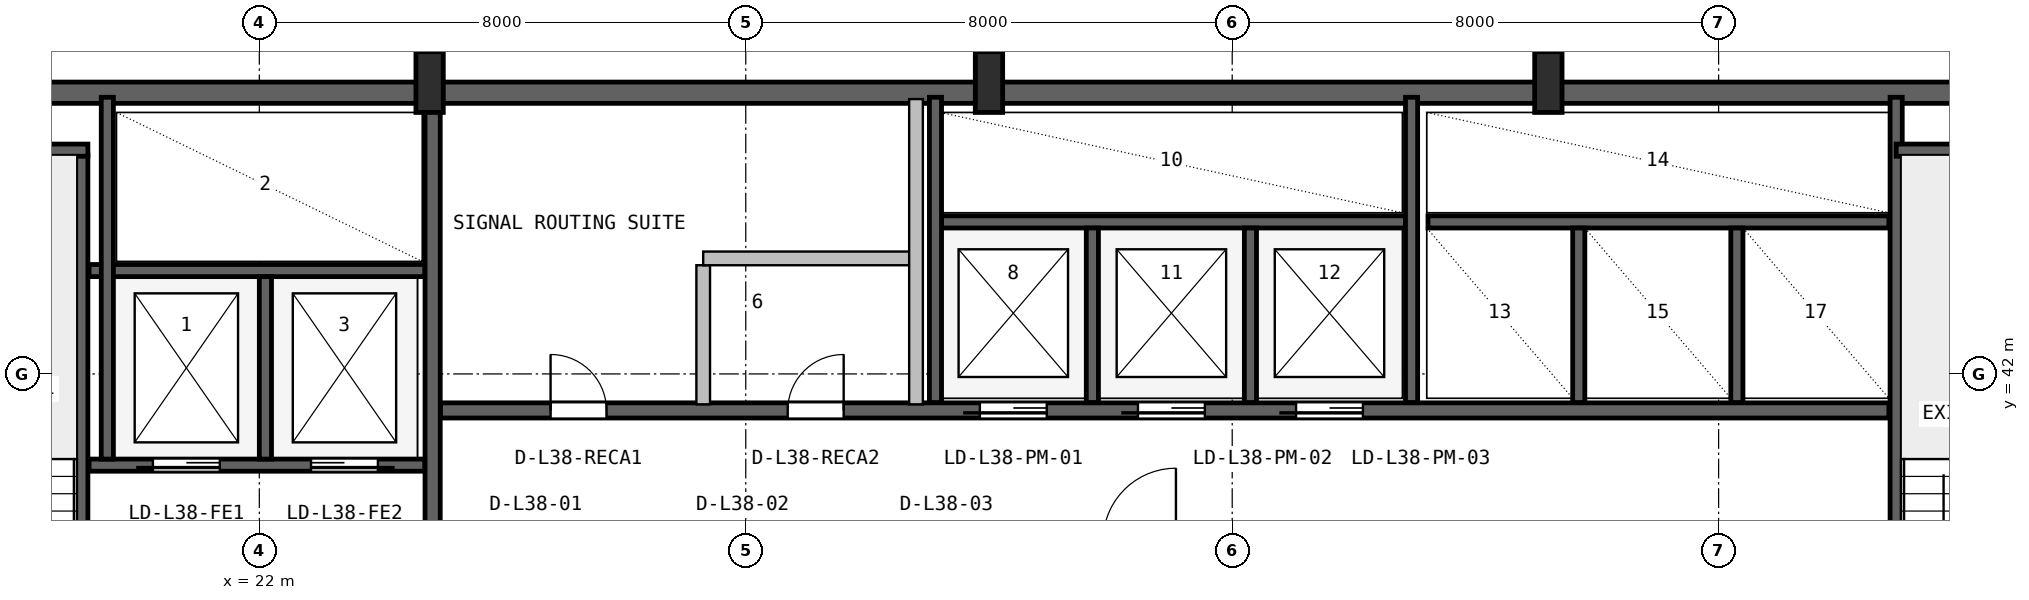
"""IFC4 building model, lengths in metres.
Left out: names, types, materials, properties, quantities, classifications, styles, units other than length and angle.
Written with IfcOpenShell. Run it as: python <this file> out.ifc"""

import sys

from ifc_helpers import new_model, si_unit, direction, frame, frame_2d, origin, origin_2d, place, context, subcontext, project, spatial, rectangle, i_section, extrude, source, transform, mapped, element, fill, save


model = new_model("IFC4")
c1 = context("Model", 3, precision=1e-05, world=origin(), true_north=direction((0.0, 1.0)))
c2 = subcontext(c1, "Body", "Model", "MODEL_VIEW")
j1 = project(units=[si_unit("LENGTHUNIT", "METRE"), si_unit("PLANEANGLEUNIT", "RADIAN")], contexts=[c1])
p1 = place(None, origin())
s1 = spatial("IfcSite", under=j1, at=p1, CompositionType="ELEMENT")
p2 = place(p1, origin())
s2 = spatial("IfcBuilding", under=s1, at=p2, CompositionType="ELEMENT")
p3 = place(p2, frame((0.0, 0.0, 157.2)))
s3 = spatial("IfcBuildingStorey", under=s2, at=p3, CompositionType="ELEMENT", Elevation=157.2)
p4 = place(p3, frame((15.6, 46.625, 0.0), z_axis=(0.0, 0.0, 1.0), x_axis=(1.0, 0.0, 0.0)))
e1 = element("IfcWall", 1, at=p4, inside=s3, PredefinedType="SHEAR", context=c2, shape_type="SweptSolid", body=[
    extrude(rectangle(XDim=36.8, YDim=0.35, at=frame_2d((18.4, 0.0))), origin(), (0.0, 0.0, 1.0), 3.55),
])
m1 = source(origin(), c2, "Body", "SweptSolid", [
    extrude(i_section(OverallWidth=0.45, OverallDepth=1.0, WebThickness=0.016, FlangeThickness=0.03, FilletRadius=0.016, at=origin_2d()), origin(), (0.0, 0.0, 1.0), 3.8),
])
for number, where, z_axis, x_axis in (
    (2, (24.8, 46.8, 0.0), (0.0, 0.0, 1.0), (1.0, 0.0, 0.0)),
    (3, (34.0, 46.8, 0.0), (0.0, 0.0, 1.0), (1.0, 0.0, 0.0)),
    (4, (43.2, 46.8, 0.0), (0.0, 0.0, 1.0), (1.0, 0.0, 0.0)),
):
    element("IfcColumn", number, at=place(p3, frame(where, z_axis=z_axis, x_axis=x_axis)), inside=s3, PredefinedType="COLUMN", context=c2, shape_type="MappedRepresentation", body=[
        mapped(m1, transform((0.0, 0.0, 0.0), x_axis=(1.0, 0.0, 0.0), y_axis=(0.0, 1.0, 0.0), z_axis=(0.0, 0.0, 1.0), scale=1.0)),
    ])
p5 = place(p3, frame((19.08, 35.95, 0.0), z_axis=(0.0, 0.0, 1.0), x_axis=(0.0, 1.0, 0.0)))
e5 = element("IfcWall", 5, at=p5, inside=s3, PredefinedType="SHEAR", context=c2, shape_type="SweptSolid", body=[
    extrude(rectangle(XDim=9.65, YDim=0.2, at=frame_2d((4.825, 0.0))), origin(), (0.0, 0.0, 1.0), 3.55),
])
p6 = place(p5, frame((0.25, 0.0, 0.0)))
e6 = element("IfcOpeningElement", 6, at=p6, cuts=e5, PredefinedType="OPENING", context=c2, shape_type="SweptSolid", body=[
    extrude(rectangle(XDim=0.95, YDim=2.1, at=frame_2d((0.475, 1.05))), frame((0.0, 0.11, 0.0), z_axis=(0.0, -1.0, 0.0), x_axis=(1.0, 0.0, 0.0)), (0.0, 0.0, 1.0), 0.22),
])
p7 = place(p3, frame((15.95, 45.68, 0.0), z_axis=(0.0, 0.0, 1.0), x_axis=(1.0, 0.0, 0.0)))
e7 = element("IfcWall", 7, at=p7, inside=s3, PredefinedType="SHEAR", context=c2, shape_type="SweptSolid", body=[
    extrude(rectangle(XDim=3.23, YDim=0.2, at=frame_2d((1.615, 0.0))), origin(), (0.0, 0.0, 1.0), 3.55),
])
p8 = place(p3, frame((24.85, 36.05, 0.0), z_axis=(0.0, 0.0, 1.0), x_axis=(0.0, 1.0, 0.0)))
e8 = element("IfcWall", 8, at=p8, inside=s3, PredefinedType="SHEAR", context=c2, shape_type="SweptSolid", body=[
    extrude(rectangle(XDim=10.45, YDim=0.25, at=frame_2d((5.225, 0.0))), origin(), (0.0, 0.0, 1.0), 3.55),
])
p9 = place(p3, frame((19.2, 40.5, 0.0), z_axis=(0.0, 0.0, 1.0), x_axis=(1.0, 0.0, 0.0)))
e9 = element("IfcWall", 9, at=p9, inside=s3, PredefinedType="SHEAR", context=c2, shape_type="SweptSolid", body=[
    extrude(rectangle(XDim=5.52, YDim=0.2, at=frame_2d((2.76, 0.0))), origin(), (0.0, 0.0, 1.0), 3.55),
])
p10 = place(p9, frame((1.05, 0.0, 0.0)))
e10 = element("IfcOpeningElement", 10, at=p10, cuts=e9, PredefinedType="OPENING", context=c2, shape_type="SweptSolid", body=[
    extrude(rectangle(XDim=1.1, YDim=2.18, at=frame_2d((0.55, 1.09))), frame((0.0, 0.11, 0.0), z_axis=(0.0, -1.0, 0.0), x_axis=(1.0, 0.0, 0.0)), (0.0, 0.0, 1.0), 0.22),
])
p11 = place(p9, frame((3.65, 0.0, 0.0)))
e11 = element("IfcOpeningElement", 11, at=p11, cuts=e9, PredefinedType="OPENING", context=c2, shape_type="SweptSolid", body=[
    extrude(rectangle(XDim=1.1, YDim=2.18, at=frame_2d((0.55, 1.09))), frame((0.0, 0.11, 0.0), z_axis=(0.0, -1.0, 0.0), x_axis=(1.0, 0.0, 0.0)), (0.0, 0.0, 1.0), 0.22),
])
p12 = place(p3, frame((19.2, 43.7, 0.0), z_axis=(0.0, 0.0, 1.0), x_axis=(1.0, 0.0, 0.0)))
e12 = element("IfcWall", 12, at=p12, inside=s3, PredefinedType="SHEAR", context=c2, shape_type="SweptSolid", body=[
    extrude(rectangle(XDim=5.52, YDim=0.2, at=frame_2d((2.76, 0.0))), origin(), (0.0, 0.0, 1.0), 3.55),
])
p13 = place(p3, frame((22.1, 40.6, 0.0), z_axis=(0.0, 0.0, 1.0), x_axis=(0.0, 1.0, 0.0)))
e13 = element("IfcWall", 13, at=p13, inside=s3, PredefinedType="SHEAR", context=c2, shape_type="SweptSolid", body=[
    extrude(rectangle(XDim=3.0, YDim=0.2, at=frame_2d((1.5, 0.0))), origin(), (0.0, 0.0, 1.0), 3.55),
])
p14 = place(p3, frame((19.5, 40.6, 0.0), z_axis=(0.0, 0.0, 1.0), x_axis=(0.0, 1.0, 0.0)))
e14 = element("IfcWall", 14, at=p14, inside=s3, PredefinedType="SHEAR", context=c2, shape_type="SweptSolid", body=[
    extrude(rectangle(XDim=5.95, YDim=0.2, at=frame_2d((2.975, 0.0))), origin(), (0.0, 0.0, 1.0), 3.55),
])
p15 = place(p3, frame((48.92, 36.05, 0.0), z_axis=(0.0, 0.0, 1.0), x_axis=(0.0, 1.0, 0.0)))
e15 = element("IfcWall", 15, at=p15, inside=s3, PredefinedType="SHEAR", context=c2, shape_type="SweptSolid", body=[
    extrude(rectangle(XDim=10.5, YDim=0.2, at=frame_2d((5.25, 0.0))), origin(), (0.0, 0.0, 1.0), 3.55),
])
p16 = place(p3, frame((48.92, 45.68, 0.0), z_axis=(0.0, 0.0, 1.0), x_axis=(1.0, 0.0, 0.0)))
e16 = element("IfcWall", 16, at=p16, inside=s3, PredefinedType="SHEAR", context=c2, shape_type="SweptSolid", body=[
    extrude(rectangle(XDim=3.18, YDim=0.2, at=frame_2d((1.59, 0.0))), origin(), (0.0, 0.0, 1.0), 3.55),
])
p17 = place(p3, frame((24.98, 41.4, 0.0), z_axis=(0.0, 0.0, 1.0), x_axis=(1.0, 0.0, 0.0)))
e17 = element("IfcWall", 17, at=p17, inside=s3, PredefinedType="SHEAR", context=c2, shape_type="SweptSolid", body=[
    extrude(rectangle(XDim=23.82, YDim=0.25, at=frame_2d((11.91, 0.0))), origin(), (0.0, 0.0, 1.0), 3.55),
])
p18 = place(p17, frame((8.87, 0.0, 0.0)))
e18 = element("IfcOpeningElement", 18, at=p18, cuts=e17, PredefinedType="OPENING", context=c2, shape_type="SweptSolid", body=[
    extrude(rectangle(XDim=1.1, YDim=2.18, at=frame_2d((0.55, 1.09))), frame((0.0, 0.135, 0.0), z_axis=(0.0, -1.0, 0.0), x_axis=(1.0, 0.0, 0.0)), (0.0, 0.0, 1.0), 0.27),
])
p19 = place(p17, frame((11.47, 0.0, 0.0)))
e19 = element("IfcOpeningElement", 19, at=p19, cuts=e17, PredefinedType="OPENING", context=c2, shape_type="SweptSolid", body=[
    extrude(rectangle(XDim=1.1, YDim=2.18, at=frame_2d((0.55, 1.09))), frame((0.0, 0.135, 0.0), z_axis=(0.0, -1.0, 0.0), x_axis=(1.0, 0.0, 0.0)), (0.0, 0.0, 1.0), 0.27),
])
p20 = place(p17, frame((14.07, 0.0, 0.0)))
e20 = element("IfcOpeningElement", 20, at=p20, cuts=e17, PredefinedType="OPENING", context=c2, shape_type="SweptSolid", body=[
    extrude(rectangle(XDim=1.1, YDim=2.18, at=frame_2d((0.55, 1.09))), frame((0.0, 0.135, 0.0), z_axis=(0.0, -1.0, 0.0), x_axis=(1.0, 0.0, 0.0)), (0.0, 0.0, 1.0), 0.27),
])
p21 = place(p17, frame((1.81, 0.0, 0.0)))
e21 = element("IfcOpeningElement", 21, at=p21, cuts=e17, PredefinedType="OPENING", context=c2, shape_type="SweptSolid", body=[
    extrude(rectangle(XDim=0.92, YDim=2.08, at=frame_2d((0.46, 1.04))), frame((0.0, 0.135, 0.0), z_axis=(0.0, -1.0, 0.0), x_axis=(1.0, 0.0, 0.0)), (0.0, 0.0, 1.0), 0.27),
])
p22 = place(p17, frame((5.71, 0.0, 0.0)))
e22 = element("IfcOpeningElement", 22, at=p22, cuts=e17, PredefinedType="OPENING", context=c2, shape_type="SweptSolid", body=[
    extrude(rectangle(XDim=0.92, YDim=2.08, at=frame_2d((0.46, 1.04))), frame((0.0, 0.135, 0.0), z_axis=(0.0, -1.0, 0.0), x_axis=(1.0, 0.0, 0.0)), (0.0, 0.0, 1.0), 0.27),
])
p23 = place(p3, frame((33.22, 44.5, 0.0), z_axis=(0.0, 0.0, 1.0), x_axis=(1.0, 0.0, 0.0)))
e23 = element("IfcWall", 23, at=p23, inside=s3, PredefinedType="SHEAR", context=c2, shape_type="SweptSolid", body=[
    extrude(rectangle(XDim=7.63, YDim=0.2, at=frame_2d((3.815, 0.0))), origin(), (0.0, 0.0, 1.0), 3.55),
])
p24 = place(p3, frame((33.12, 41.53, 0.0), z_axis=(0.0, 0.0, 1.0), x_axis=(0.0, 1.0, 0.0)))
e24 = element("IfcWall", 24, at=p24, inside=s3, PredefinedType="SHEAR", context=c2, shape_type="SweptSolid", body=[
    extrude(rectangle(XDim=5.02, YDim=0.2, at=frame_2d((2.51, 0.0))), origin(), (0.0, 0.0, 1.0), 3.55),
])
for number, where, z_axis, x_axis in (
    (25, (35.7, 41.53, 0.0), (0.0, 0.0, 1.0), (0.0, 1.0, 0.0)),
    (26, (38.3, 41.53, 0.0), (0.0, 0.0, 1.0), (0.0, 1.0, 0.0)),
):
    element("IfcWall", number, at=place(p3, frame(where, z_axis=z_axis, x_axis=x_axis)), inside=s3, PredefinedType="SHEAR", context=c2, shape_type="SweptSolid", body=[
        extrude(rectangle(XDim=2.87, YDim=0.2, at=frame_2d((1.435, 0.0))), origin(), (0.0, 0.0, 1.0), 3.55),
    ])
p25 = place(p3, frame((40.95, 41.53, 0.0), z_axis=(0.0, 0.0, 1.0), x_axis=(0.0, 1.0, 0.0)))
e27 = element("IfcWall", 27, at=p25, inside=s3, PredefinedType="SHEAR", context=c2, shape_type="SweptSolid", body=[
    extrude(rectangle(XDim=5.02, YDim=0.2, at=frame_2d((2.51, 0.0))), origin(), (0.0, 0.0, 1.0), 3.55),
])
p26 = place(p3, frame((41.22, 44.5, 0.0), z_axis=(0.0, 0.0, 1.0), x_axis=(1.0, 0.0, 0.0)))
e28 = element("IfcWall", 28, at=p26, inside=s3, PredefinedType="SHEAR", context=c2, shape_type="SweptSolid", body=[
    extrude(rectangle(XDim=7.58, YDim=0.2, at=frame_2d((3.79, 0.0))), origin(), (0.0, 0.0, 1.0), 3.55),
])
for number, where, z_axis, x_axis in (
    (29, (43.7, 41.53, 0.0), (0.0, 0.0, 1.0), (0.0, 1.0, 0.0)),
    (30, (46.3, 41.53, 0.0), (0.0, 0.0, 1.0), (0.0, 1.0, 0.0)),
):
    element("IfcWall", number, at=place(p3, frame(where, z_axis=z_axis, x_axis=x_axis)), inside=s3, PredefinedType="SHEAR", context=c2, shape_type="SweptSolid", body=[
        extrude(rectangle(XDim=2.87, YDim=0.2, at=frame_2d((1.435, 0.0))), origin(), (0.0, 0.0, 1.0), 3.55),
    ])
p27 = place(p3, frame((29.3, 41.5, 0.0), z_axis=(0.0, 0.0, 1.0), x_axis=(0.0, 1.0, 0.0)))
e31 = element("IfcWall", 31, at=p27, inside=s3, PredefinedType="PARTITIONING", context=c2, shape_type="SweptSolid", body=[
    extrude(rectangle(XDim=2.288, YDim=0.225, at=frame_2d((1.144, 0.0))), origin(), (0.0, 0.0, 1.0), 3.53),
])
p28 = place(p3, frame((29.3, 43.9, 0.0), z_axis=(0.0, 0.0, 1.0), x_axis=(1.0, 0.0, 0.0)))
e32 = element("IfcWall", 32, at=p28, inside=s3, PredefinedType="PARTITIONING", context=c2, shape_type="SweptSolid", body=[
    extrude(rectangle(XDim=3.5, YDim=0.225, at=frame_2d((1.75, 0.0))), origin(), (0.0, 0.0, 1.0), 3.53),
])
p29 = place(p3, frame((32.8, 41.5, 0.0), z_axis=(0.0, 0.0, 1.0), x_axis=(0.0, 1.0, 0.0)))
e33 = element("IfcWall", 33, at=p29, inside=s3, PredefinedType="PARTITIONING", context=c2, shape_type="SweptSolid", body=[
    extrude(rectangle(XDim=5.02, YDim=0.225, at=frame_2d((2.51, 0.0))), origin(), (0.0, 0.0, 1.0), 3.53),
])
m2 = source(origin(), c2, "Body", "SweptSolid", [
    extrude(rectangle(XDim=1.1, YDim=2.18, at=frame_2d((0.55, 1.09))), frame((0.0, 0.025, 0.0), z_axis=(0.0, -1.0, 0.0), x_axis=(1.0, 0.0, 0.0)), (0.0, 0.0, 1.0), 0.05),
])
p30 = place(p10, frame((1.1, 0.0, 0.0), z_axis=(0.0, 0.0, 1.0), x_axis=(-1.0, 0.0, 0.0)))
e34 = element("IfcDoor", 34, at=p30, inside=s3, OperationType="SLIDING_TO_LEFT", PredefinedType="DOOR", context=c2, shape_type="MappedRepresentation", body=[
    mapped(m2, transform((0.0, 0.0, 0.0), x_axis=(1.0, 0.0, 0.0), y_axis=(0.0, 1.0, 0.0), z_axis=(0.0, 0.0, 1.0), scale=1.0)),
])
fill(e10, e34)
p31 = place(p11, frame((1.1, 0.0, 0.0), z_axis=(0.0, 0.0, 1.0), x_axis=(-1.0, 0.0, 0.0)))
e35 = element("IfcDoor", 35, at=p31, inside=s3, OperationType="SLIDING_TO_RIGHT", PredefinedType="DOOR", context=c2, shape_type="MappedRepresentation", body=[
    mapped(m2, transform((0.0, 0.0, 0.0), x_axis=(1.0, 0.0, 0.0), y_axis=(0.0, 1.0, 0.0), z_axis=(0.0, 0.0, 1.0), scale=1.0)),
])
fill(e11, e35)
p32 = place(p18, frame((1.1, 0.0, 0.0), z_axis=(0.0, 0.0, 1.0), x_axis=(-1.0, 0.0, 0.0)))
e36 = element("IfcDoor", 36, at=p32, inside=s3, OperationType="SLIDING_TO_LEFT", PredefinedType="DOOR", context=c2, shape_type="MappedRepresentation", body=[
    mapped(m2, transform((0.0, 0.0, 0.0), x_axis=(1.0, 0.0, 0.0), y_axis=(0.0, 1.0, 0.0), z_axis=(0.0, 0.0, 1.0), scale=1.0)),
])
fill(e18, e36)
p33 = place(p19, frame((1.1, 0.0, 0.0), z_axis=(0.0, 0.0, 1.0), x_axis=(-1.0, 0.0, 0.0)))
e37 = element("IfcDoor", 37, at=p33, inside=s3, OperationType="SLIDING_TO_LEFT", PredefinedType="DOOR", context=c2, shape_type="MappedRepresentation", body=[
    mapped(m2, transform((0.0, 0.0, 0.0), x_axis=(1.0, 0.0, 0.0), y_axis=(0.0, 1.0, 0.0), z_axis=(0.0, 0.0, 1.0), scale=1.0)),
])
fill(e19, e37)
p34 = place(p20, frame((1.1, 0.0, 0.0), z_axis=(0.0, 0.0, 1.0), x_axis=(-1.0, 0.0, 0.0)))
e38 = element("IfcDoor", 38, at=p34, inside=s3, OperationType="SLIDING_TO_LEFT", PredefinedType="DOOR", context=c2, shape_type="MappedRepresentation", body=[
    mapped(m2, transform((0.0, 0.0, 0.0), x_axis=(1.0, 0.0, 0.0), y_axis=(0.0, 1.0, 0.0), z_axis=(0.0, 0.0, 1.0), scale=1.0)),
])
fill(e20, e38)
m3 = source(origin(), c2, "Body", "SweptSolid", [
    extrude(rectangle(XDim=0.92, YDim=2.08, at=frame_2d((0.46, 1.04))), frame((0.0, 0.025, 0.0), z_axis=(0.0, -1.0, 0.0), x_axis=(1.0, 0.0, 0.0)), (0.0, 0.0, 1.0), 0.05),
])
p35 = place(p21, origin())
e39 = element("IfcDoor", 39, at=p35, inside=s3, OperationType="SINGLE_SWING_LEFT", PredefinedType="DOOR", context=c2, shape_type="MappedRepresentation", body=[
    mapped(m3, transform((0.0, 0.0, 0.0), x_axis=(1.0, 0.0, 0.0), y_axis=(0.0, 1.0, 0.0), z_axis=(0.0, 0.0, 1.0), scale=1.0)),
])
fill(e21, e39)
p36 = place(p22, origin())
e40 = element("IfcDoor", 40, at=p36, inside=s3, OperationType="SINGLE_SWING_RIGHT", PredefinedType="DOOR", context=c2, shape_type="MappedRepresentation", body=[
    mapped(m3, transform((0.0, 0.0, 0.0), x_axis=(1.0, 0.0, 0.0), y_axis=(0.0, 1.0, 0.0), z_axis=(0.0, 0.0, 1.0), scale=1.0)),
])
fill(e22, e40)
save(model, sys.argv[1])
